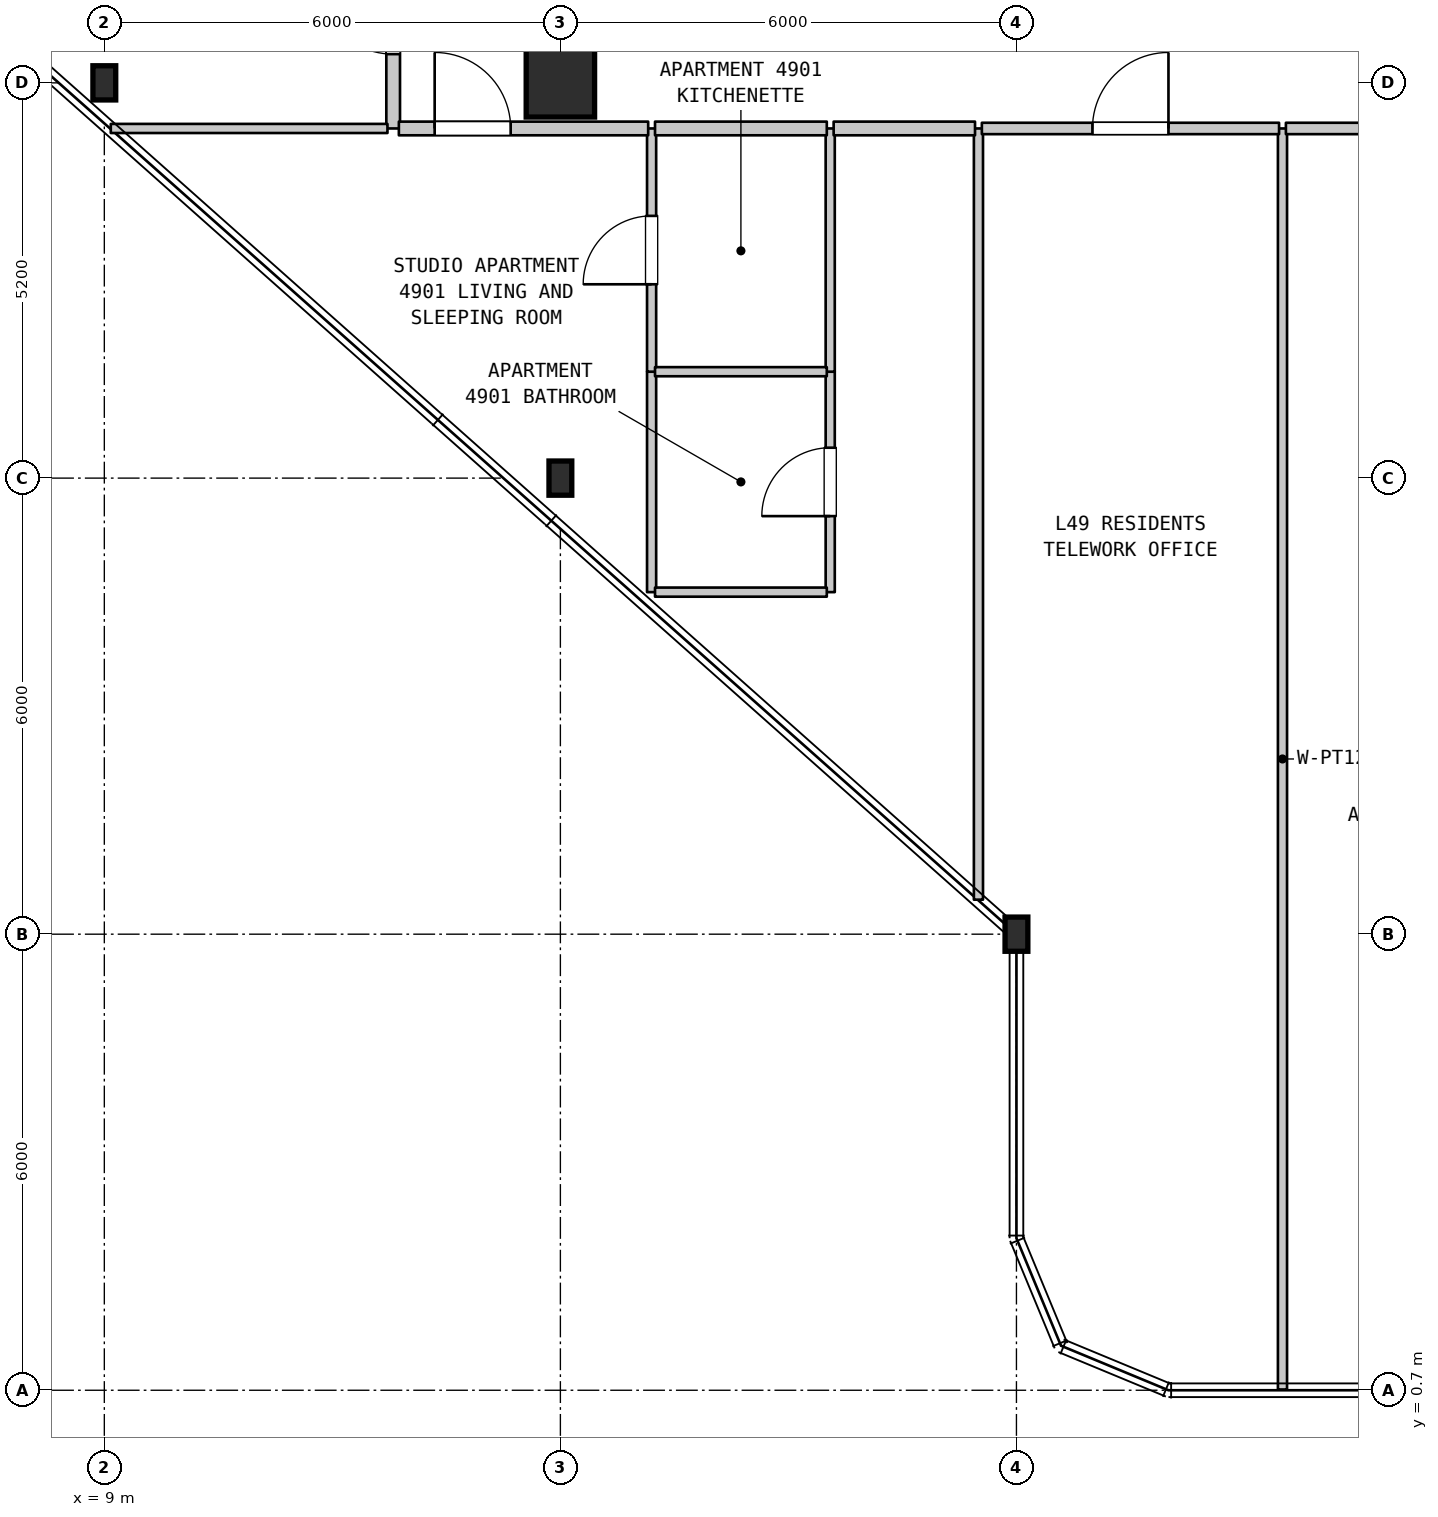
"""IFC4 building model, lengths in metres.
Left out: names, types, materials, properties, quantities, classifications, styles, units other than length and angle.
Written with IfcOpenShell. Run it as: python <this file> out.ifc"""

import sys

from ifc_helpers import new_model, si_unit, direction, frame, frame_2d, origin, origin_2d, place, context, subcontext, project, spatial, rectangle, i_section, extrude, element, fill, save


model = new_model("IFC4")
c1 = context("Model", 3, precision=1e-05, world=origin(), true_north=direction((0.0, 1.0)))
c2 = subcontext(c1, "Body", "Model", "MODEL_VIEW")
j1 = project(units=[si_unit("LENGTHUNIT", "METRE"), si_unit("PLANEANGLEUNIT", "RADIAN")], contexts=[c1])
p1 = place(None, origin())
s1 = spatial("IfcSite", under=j1, at=p1, CompositionType="ELEMENT")
p2 = place(p1, origin())
s2 = spatial("IfcBuilding", under=s1, at=p2, CompositionType="ELEMENT")
p3 = place(p2, frame((0.0, 0.0, 199.5)))
s3 = spatial("IfcBuildingStorey", under=s2, at=p3, CompositionType="ELEMENT", Elevation=199.5)
for number, where, z_axis, x_axis in (
    (1, (9.0, 17.9, 0.0), (0.0, 0.0, 1.0), (1.0, 0.0, 0.0)),
    (2, (15.0, 12.7, 0.0), (0.0, 0.0, 1.0), (1.0, 0.0, 0.0)),
):
    element("IfcColumn", number, at=place(p3, frame(where, z_axis=z_axis, x_axis=x_axis)), inside=s3, PredefinedType="COLUMN", context=c2, shape_type="SweptSolid", body=[
        extrude(i_section(OverallWidth=0.3, OverallDepth=0.45, WebThickness=0.014, FlangeThickness=0.026, FilletRadius=0.027, at=origin_2d()), origin(), (0.0, 0.0, 1.0), 3.7),
    ])
p4 = place(p3, frame((15.0, 17.9, 0.0), z_axis=(0.0, 0.0, 1.0), x_axis=(1.0, 0.0, 0.0)))
e3 = element("IfcColumn", 3, at=p4, inside=s3, PredefinedType="COLUMN", context=c2, shape_type="SweptSolid", body=[
    extrude(rectangle(XDim=0.9, YDim=0.9, at=origin_2d()), origin(), (0.0, 0.0, 1.0), 3.7),
])
p5 = place(p3, frame((21.0, 6.7, 0.0), z_axis=(0.0, 0.0, 1.0), x_axis=(1.0, 0.0, 0.0)))
e4 = element("IfcColumn", 4, at=p5, inside=s3, PredefinedType="COLUMN", context=c2, shape_type="SweptSolid", body=[
    extrude(i_section(OverallWidth=0.3, OverallDepth=0.45, WebThickness=0.014, FlangeThickness=0.026, FilletRadius=0.027, at=origin_2d()), origin(), (0.0, 0.0, 1.0), 3.7),
])
p6 = place(p3, frame((12.8, 17.3, 0.0), z_axis=(0.0, 0.0, 1.0), x_axis=(0.0, 1.0, 0.0)))
e5 = element("IfcWall", 5, at=p6, inside=s3, PredefinedType="STANDARD", context=c2, shape_type="SweptSolid", body=[
    extrude(rectangle(XDim=3.1, YDim=0.18, at=frame_2d((1.55, 0.0))), origin(), (0.0, 0.0, 1.0), 3.39),
])
p7 = place(p6, frame((0.978, 0.0, 0.0)))
e6 = element("IfcOpeningElement", 6, at=p7, cuts=e5, PredefinedType="OPENING", context=c2, shape_type="SweptSolid", body=[
    extrude(rectangle(XDim=1.0, YDim=2.15, at=frame_2d((0.5, 1.075))), frame((0.0, 0.1, 0.0), z_axis=(0.0, -1.0, 0.0), x_axis=(1.0, 0.0, 0.0)), (0.0, 0.0, 1.0), 0.2),
])
p8 = place(p3, frame((16.2, 11.2, 0.0), z_axis=(0.0, 0.0, 1.0), x_axis=(0.0, 1.0, 0.0)))
e7 = element("IfcWall", 7, at=p8, inside=s3, PredefinedType="PARTITIONING", context=c2, shape_type="SweptSolid", body=[
    extrude(rectangle(XDim=2.9, YDim=0.12, at=frame_2d((1.45, 0.0))), origin(), (0.0, 0.0, 1.0), 3.39),
])
p9 = place(p3, frame((16.2, 14.1, 0.0), z_axis=(0.0, 0.0, 1.0), x_axis=(0.0, 1.0, 0.0)))
e8 = element("IfcWall", 8, at=p9, inside=s3, PredefinedType="PARTITIONING", context=c2, shape_type="SweptSolid", body=[
    extrude(rectangle(XDim=3.2, YDim=0.12, at=frame_2d((1.6, 0.0))), origin(), (0.0, 0.0, 1.0), 3.39),
])
p10 = place(p9, frame((1.15, 0.0, 0.0)))
e9 = element("IfcOpeningElement", 9, at=p10, cuts=e8, PredefinedType="OPENING", context=c2, shape_type="SweptSolid", body=[
    extrude(rectangle(XDim=0.9, YDim=2.15, at=frame_2d((0.45, 1.075))), frame((0.0, 0.07, 0.0), z_axis=(0.0, -1.0, 0.0), x_axis=(1.0, 0.0, 0.0)), (0.0, 0.0, 1.0), 0.14),
])
p11 = place(p3, frame((18.55, 11.2, 0.0), z_axis=(0.0, 0.0, 1.0), x_axis=(0.0, 1.0, 0.0)))
e10 = element("IfcWall", 10, at=p11, inside=s3, PredefinedType="PARTITIONING", context=c2, shape_type="SweptSolid", body=[
    extrude(rectangle(XDim=2.9, YDim=0.12, at=frame_2d((1.45, 0.0))), origin(), (0.0, 0.0, 1.0), 3.39),
])
p12 = place(p11, frame((1.0, 0.0, 0.0)))
e11 = element("IfcOpeningElement", 11, at=p12, cuts=e10, PredefinedType="OPENING", context=c2, shape_type="SweptSolid", body=[
    extrude(rectangle(XDim=0.9, YDim=2.1, at=frame_2d((0.45, 1.05))), frame((0.0, 0.07, 0.0), z_axis=(0.0, -1.0, 0.0), x_axis=(1.0, 0.0, 0.0)), (0.0, 0.0, 1.0), 0.14),
])
p13 = place(p3, frame((18.55, 14.1, 0.0), z_axis=(0.0, 0.0, 1.0), x_axis=(0.0, 1.0, 0.0)))
e12 = element("IfcWall", 12, at=p13, inside=s3, PredefinedType="PARTITIONING", context=c2, shape_type="SweptSolid", body=[
    extrude(rectangle(XDim=3.2, YDim=0.12, at=frame_2d((1.6, 0.0))), origin(), (0.0, 0.0, 1.0), 3.39),
])
p14 = place(p3, frame((20.5, 7.154, 0.0), z_axis=(0.0, 0.0, 1.0), x_axis=(0.0, 1.0, 0.0)))
e13 = element("IfcWall", 13, at=p14, inside=s3, PredefinedType="PARTITIONING", context=c2, shape_type="SweptSolid", body=[
    extrude(rectangle(XDim=10.146, YDim=0.12, at=frame_2d((5.073, 0.0))), origin(), (0.0, 0.0, 1.0), 3.39),
])
p15 = place(p3, frame((24.5, 0.71, 0.0), z_axis=(0.0, 0.0, 1.0), x_axis=(0.0, 1.0, 0.0)))
e14 = element("IfcWall", 14, at=p15, inside=s3, PredefinedType="PARTITIONING", context=c2, shape_type="SweptSolid", body=[
    extrude(rectangle(XDim=16.59, YDim=0.12, at=frame_2d((8.295, 0.0))), origin(), (0.0, 0.0, 1.0), 3.39),
])
for number, where, z_axis, x_axis in (
    (15, (16.245, 11.2, 0.0), (0.0, 0.0, 1.0), (1.0, 0.0, 0.0)),
    (16, (16.245, 14.1, 0.0), (0.0, 0.0, 1.0), (1.0, 0.0, 0.0)),
):
    element("IfcWall", number, at=place(p3, frame(where, z_axis=z_axis, x_axis=x_axis)), inside=s3, PredefinedType="PARTITIONING", context=c2, shape_type="SweptSolid", body=[
        extrude(rectangle(XDim=2.26, YDim=0.12, at=frame_2d((1.13, 0.0))), origin(), (0.0, 0.0, 1.0), 3.39),
    ])
p16 = place(p3, frame((9.085, 17.3, 0.0), z_axis=(0.0, 0.0, 1.0), x_axis=(1.0, 0.0, 0.0)))
e17 = element("IfcWall", 17, at=p16, inside=s3, PredefinedType="PARTITIONING", context=c2, shape_type="SweptSolid", body=[
    extrude(rectangle(XDim=3.64, YDim=0.12, at=frame_2d((1.82, 0.0))), origin(), (0.0, 0.0, 1.0), 3.39),
])
p17 = place(p3, frame((12.875, 17.3, 0.0), z_axis=(0.0, 0.0, 1.0), x_axis=(1.0, 0.0, 0.0)))
e18 = element("IfcWall", 18, at=p17, inside=s3, PredefinedType="STANDARD", context=c2, shape_type="SweptSolid", body=[
    extrude(rectangle(XDim=3.28, YDim=0.18, at=frame_2d((1.64, 0.0))), origin(), (0.0, 0.0, 1.0), 3.39),
])
p18 = place(p17, frame((0.471, 0.0, 0.0)))
e19 = element("IfcOpeningElement", 19, at=p18, cuts=e18, PredefinedType="OPENING", context=c2, shape_type="SweptSolid", body=[
    extrude(rectangle(XDim=1.0, YDim=2.15, at=frame_2d((0.5, 1.075))), frame((0.0, 0.1, 0.0), z_axis=(0.0, -1.0, 0.0), x_axis=(1.0, 0.0, 0.0)), (0.0, 0.0, 1.0), 0.2),
])
p19 = place(p3, frame((16.245, 17.3, 0.0), z_axis=(0.0, 0.0, 1.0), x_axis=(1.0, 0.0, 0.0)))
e20 = element("IfcWall", 20, at=p19, inside=s3, PredefinedType="STANDARD", context=c2, shape_type="SweptSolid", body=[
    extrude(rectangle(XDim=2.26, YDim=0.18, at=frame_2d((1.13, 0.0))), origin(), (0.0, 0.0, 1.0), 3.39),
])
p20 = place(p3, frame((18.595, 17.3, 0.0), z_axis=(0.0, 0.0, 1.0), x_axis=(1.0, 0.0, 0.0)))
e21 = element("IfcWall", 21, at=p20, inside=s3, PredefinedType="STANDARD", context=c2, shape_type="SweptSolid", body=[
    extrude(rectangle(XDim=1.86, YDim=0.18, at=frame_2d((0.93, 0.0))), origin(), (0.0, 0.0, 1.0), 3.39),
])
p21 = place(p3, frame((20.545, 17.3, 0.0), z_axis=(0.0, 0.0, 1.0), x_axis=(1.0, 0.0, 0.0)))
e22 = element("IfcWall", 22, at=p21, inside=s3, PredefinedType="STANDARD", context=c2, shape_type="SweptSolid", body=[
    extrude(rectangle(XDim=3.91, YDim=0.15, at=frame_2d((1.955, 0.0))), origin(), (0.0, 0.0, 1.0), 3.39),
])
p22 = place(p21, frame((1.455, 0.0, 0.0)))
e23 = element("IfcOpeningElement", 23, at=p22, cuts=e22, PredefinedType="OPENING", context=c2, shape_type="SweptSolid", body=[
    extrude(rectangle(XDim=1.0, YDim=2.15, at=frame_2d((0.5, 1.075))), frame((0.0, 0.085, 0.0), z_axis=(0.0, -1.0, 0.0), x_axis=(1.0, 0.0, 0.0)), (0.0, 0.0, 1.0), 0.17),
])
p23 = place(p3, frame((24.545, 17.3, 0.0), z_axis=(0.0, 0.0, 1.0), x_axis=(1.0, 0.0, 0.0)))
e24 = element("IfcWall", 24, at=p23, inside=s3, PredefinedType="STANDARD", context=c2, shape_type="SweptSolid", body=[
    extrude(rectangle(XDim=4.21, YDim=0.15, at=frame_2d((2.105, 0.0))), origin(), (0.0, 0.0, 1.0), 3.39),
])
p24 = place(p23, frame((1.605, 0.0, 0.0)))
e25 = element("IfcOpeningElement", 25, at=p24, cuts=e24, PredefinedType="OPENING", context=c2, shape_type="SweptSolid", body=[
    extrude(rectangle(XDim=1.0, YDim=2.15, at=frame_2d((0.5, 1.075))), frame((0.0, 0.085, 0.0), z_axis=(0.0, -1.0, 0.0), x_axis=(1.0, 0.0, 0.0)), (0.0, 0.0, 1.0), 0.17),
])
p25 = place(p7, origin())
e26 = element("IfcDoor", 26, at=p25, inside=s3, OperationType="SINGLE_SWING_RIGHT", PredefinedType="DOOR", context=c2, shape_type="SweptSolid", body=[
    extrude(rectangle(XDim=1.0, YDim=2.15, at=frame_2d((0.5, 1.075))), frame((0.0, 0.025, 0.0), z_axis=(0.0, -1.0, 0.0), x_axis=(1.0, 0.0, 0.0)), (0.0, 0.0, 1.0), 0.05),
])
fill(e6, e26)
p26 = place(p10, origin())
e27 = element("IfcDoor", 27, at=p26, inside=s3, OperationType="SINGLE_SWING_LEFT", PredefinedType="DOOR", context=c2, shape_type="SweptSolid", body=[
    extrude(rectangle(XDim=0.9, YDim=2.15, at=frame_2d((0.45, 1.075))), frame((0.0, 0.025, 0.0), z_axis=(0.0, -1.0, 0.0), x_axis=(1.0, 0.0, 0.0)), (0.0, 0.0, 1.0), 0.05),
])
fill(e9, e27)
p27 = place(p12, origin())
e28 = element("IfcDoor", 28, at=p27, inside=s3, OperationType="SINGLE_SWING_LEFT", PredefinedType="DOOR", context=c2, shape_type="SweptSolid", body=[
    extrude(rectangle(XDim=0.9, YDim=2.1, at=frame_2d((0.45, 1.05))), frame((0.0, 0.025, 0.0), z_axis=(0.0, -1.0, 0.0), x_axis=(1.0, 0.0, 0.0)), (0.0, 0.0, 1.0), 0.05),
])
fill(e11, e28)
p28 = place(p18, origin())
e29 = element("IfcDoor", 29, at=p28, inside=s3, OperationType="SINGLE_SWING_LEFT", PredefinedType="DOOR", context=c2, shape_type="SweptSolid", body=[
    extrude(rectangle(XDim=1.0, YDim=2.15, at=frame_2d((0.5, 1.075))), frame((0.0, 0.025, 0.0), z_axis=(0.0, -1.0, 0.0), x_axis=(1.0, 0.0, 0.0)), (0.0, 0.0, 1.0), 0.05),
])
fill(e19, e29)
p29 = place(p22, origin())
e30 = element("IfcDoor", 30, at=p29, inside=s3, OperationType="SINGLE_SWING_RIGHT", PredefinedType="DOOR", context=c2, shape_type="SweptSolid", body=[
    extrude(rectangle(XDim=1.0, YDim=2.15, at=frame_2d((0.5, 1.075))), frame((0.0, 0.025, 0.0), z_axis=(0.0, -1.0, 0.0), x_axis=(1.0, 0.0, 0.0)), (0.0, 0.0, 1.0), 0.05),
])
fill(e23, e30)
save(model, sys.argv[1])
